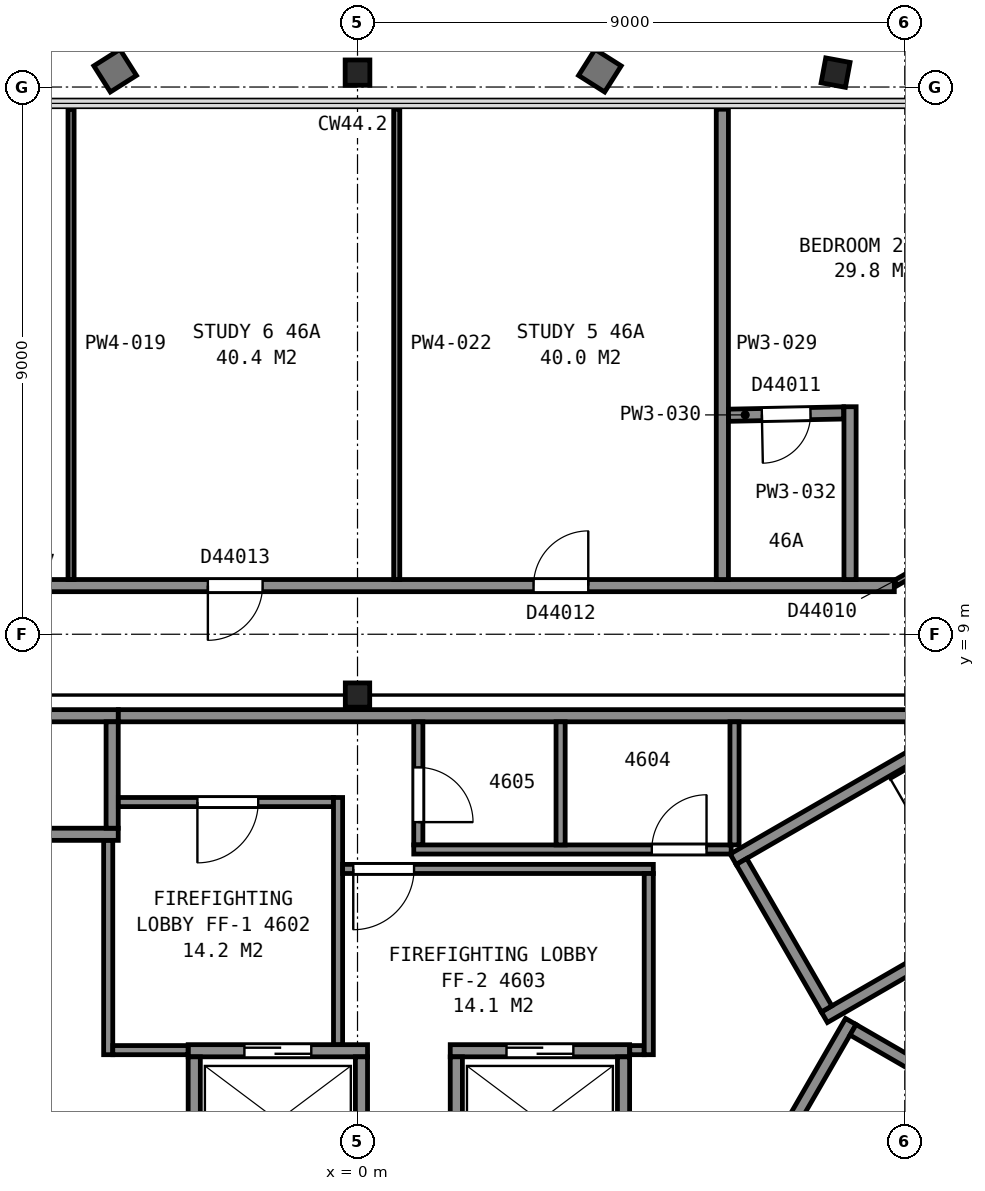
"""IFC4 building model, lengths in metres.
Left out: names, types, materials, properties, quantities, classifications, styles, units other than length and angle.
Written with IfcOpenShell. Run it as: python <this file> out.ifc"""

import sys

from ifc_helpers import new_model, si_unit, direction, frame, frame_2d, origin, origin_2d, place, context, subcontext, project, spatial, rectangle, i_section, extrude, element, fill, save


model = new_model("IFC4")
c1 = context("Model", 3, precision=1e-05, world=origin(), true_north=direction((0.0, 1.0)))
c2 = subcontext(c1, "Body", "Model", "MODEL_VIEW")
j1 = project(units=[si_unit("LENGTHUNIT", "METRE"), si_unit("PLANEANGLEUNIT", "RADIAN")], contexts=[c1])
p1 = place(None, origin())
s1 = spatial("IfcSite", under=j1, at=p1, CompositionType="ELEMENT")
p2 = place(p1, origin())
s2 = spatial("IfcBuilding", under=s1, at=p2, CompositionType="ELEMENT")
p3 = place(p2, frame((0.0, 0.0, 185.8)))
s3 = spatial("IfcBuildingStorey", under=s2, at=p3, CompositionType="ELEMENT", Elevation=185.8)
p4 = place(p3, frame((7.821, 18.017, 0.035), z_axis=(0.03447421706, 0.185777725267, 0.981986845713), x_axis=(0.999383372128, 0.000143167918, -0.035112035215)))
e1 = element("IfcColumn", 1, at=p4, inside=s3, PredefinedType="COLUMN", context=c2, shape_type="SweptSolid", body=[
    extrude(i_section(OverallWidth=0.406, OverallDepth=0.417, WebThickness=0.03, FlangeThickness=0.048, FilletRadius=0.015, at=origin_2d()), origin(), (0.0, 0.0, 1.0), 3.697),
])
p5 = place(p3, frame((0.0, 18.016, 0.03), z_axis=(0.0, 0.185915743066, 0.982565690669), x_axis=(1.0, 0.0, 0.0)))
e2 = element("IfcColumn", 2, at=p5, inside=s3, PredefinedType="COLUMN", context=c2, shape_type="SweptSolid", body=[
    extrude(i_section(OverallWidth=0.406, OverallDepth=0.417, WebThickness=0.03, FlangeThickness=0.048, FilletRadius=0.015, at=origin_2d()), origin(), (0.0, 0.0, 1.0), 3.705),
])
p6 = place(p3, frame((0.0, 8.0, 0.0), z_axis=(0.0, 0.0, 1.0), x_axis=(1.0, 0.0, 0.0)))
e3 = element("IfcColumn", 3, at=p6, inside=s3, PredefinedType="COLUMN", context=c2, shape_type="SweptSolid", body=[
    extrude(i_section(OverallWidth=0.401, OverallDepth=0.399, WebThickness=0.025, FlangeThickness=0.04, FilletRadius=0.015, at=origin_2d()), origin(), (0.0, 0.0, 1.0), 3.7),
])
for number, where, z_axis, x_axis in (
    (4, (6.178, 5.299, 0.0), (0.0, 0.0, 1.0), (0.866, 0.5, 0.0)),
    (5, (7.678, 2.701, 0.0), (0.0, 0.0, 1.0), (0.866, 0.5, 0.0)),
):
    element("IfcWall", number, at=place(p3, frame(where, z_axis=z_axis, x_axis=x_axis)), inside=s3, PredefinedType="PARTITIONING", context=c2, shape_type="SweptSolid", body=[
        extrude(rectangle(XDim=9.6, YDim=0.2, at=frame_2d((4.8, 0.0))), origin(), (0.0, 0.0, 1.0), 3.45),
    ])
p7 = place(p3, frame((7.715, 2.838, 0.0), z_axis=(0.0, 0.0, 1.0), x_axis=(-0.500049511043, 0.865996816683, 0.0)))
e6 = element("IfcWall", 6, at=p7, inside=s3, PredefinedType="PARTITIONING", context=c2, shape_type="SweptSolid", body=[
    extrude(rectangle(XDim=2.8, YDim=0.2, at=frame_2d((1.4, 0.0))), origin(), (0.0, 0.0, 1.0), 3.45),
])
p8 = place(p3, frame((-2.785, 2.15, 0.0), z_axis=(0.0, 0.0, 1.0), x_axis=(1.0, 0.0, 0.0)))
e7 = element("IfcWall", 7, at=p8, inside=s3, PredefinedType="PARTITIONING", context=c2, shape_type="SweptSolid", body=[
    extrude(rectangle(XDim=2.95, YDim=0.2, at=frame_2d((1.475, 0.0))), origin(), (0.0, 0.0, 1.0), 3.7),
])
p9 = place(p8, frame((0.925, 0.0, 0.0)))
e8 = element("IfcOpeningElement", 8, at=p9, cuts=e7, PredefinedType="OPENING", context=c2, shape_type="SweptSolid", body=[
    extrude(rectangle(XDim=1.1, YDim=2.1, at=frame_2d((0.55, 1.05))), frame((0.0, 0.11, 0.0), z_axis=(0.0, -1.0, 0.0), x_axis=(1.0, 0.0, 0.0)), (0.0, 0.0, 1.0), 0.22),
])
p10 = place(p3, frame((1.525, 2.15, 0.0), z_axis=(0.0, 0.0, 1.0), x_axis=(1.0, 0.0, 0.0)))
e9 = element("IfcWall", 9, at=p10, inside=s3, PredefinedType="PARTITIONING", context=c2, shape_type="SweptSolid", body=[
    extrude(rectangle(XDim=2.95, YDim=0.2, at=frame_2d((1.475, 0.0))), origin(), (0.0, 0.0, 1.0), 3.7),
])
p11 = place(p10, frame((0.925, 0.0, 0.0)))
e10 = element("IfcOpeningElement", 10, at=p11, cuts=e9, PredefinedType="OPENING", context=c2, shape_type="SweptSolid", body=[
    extrude(rectangle(XDim=1.1, YDim=2.1, at=frame_2d((0.55, 1.05))), frame((0.0, 0.11, 0.0), z_axis=(0.0, -1.0, 0.0), x_axis=(1.0, 0.0, 0.0)), (0.0, 0.0, 1.0), 0.22),
])
for number, where, z_axis, x_axis in (
    (11, (-6.285, 5.71, 0.0), (0.0, 0.0, 1.0), (1.0, 0.0, 0.0)),
    (12, (-6.285, 7.66, 0.0), (0.0, 0.0, 1.0), (1.0, 0.0, 0.0)),
):
    element("IfcWall", number, at=place(p3, frame(where, z_axis=z_axis, x_axis=x_axis)), inside=s3, PredefinedType="PARTITIONING", context=c2, shape_type="SweptSolid", body=[
        extrude(rectangle(XDim=2.35, YDim=0.2, at=frame_2d((1.175, 0.0))), origin(), (0.0, 0.0, 1.0), 3.7),
    ])
p12 = place(p3, frame((7.351, -2.587, 0.0), z_axis=(0.0, 0.0, 1.0), x_axis=(0.500002801628, 0.866023786258, 0.0)))
e13 = element("IfcWall", 13, at=p12, inside=s3, PredefinedType="PARTITIONING", context=c2, shape_type="SweptSolid", body=[
    extrude(rectangle(XDim=4.9, YDim=0.2, at=frame_2d((2.45, 0.0))), origin(), (0.0, 0.0, 1.0), 3.7),
])
p13 = place(p3, frame((5.663, -1.612, 0.0), z_axis=(0.0, 0.0, 1.0), x_axis=(0.49998122708, 0.866036242063, 0.0)))
e14 = element("IfcWall", 14, at=p13, inside=s3, PredefinedType="PARTITIONING", context=c2, shape_type="SweptSolid", body=[
    extrude(rectangle(XDim=4.9, YDim=0.2, at=frame_2d((2.45, 0.0))), origin(), (0.0, 0.0, 1.0), 3.7),
])
for number, where, z_axis, x_axis in (
    (15, (4.375, 0.1, 0.0), (0.0, 0.0, 1.0), (0.0, 1.0, 0.0)),
    (16, (1.625, 0.1, 0.0), (0.0, 0.0, 1.0), (0.0, 1.0, 0.0)),
    (17, (0.065, 0.1, 0.0), (0.0, 0.0, 1.0), (0.0, 1.0, 0.0)),
    (18, (-2.685, 0.1, 0.0), (0.0, 0.0, 1.0), (0.0, 1.0, 0.0)),
):
    element("IfcWall", number, at=place(p3, frame(where, z_axis=z_axis, x_axis=x_axis)), inside=s3, PredefinedType="PARTITIONING", context=c2, shape_type="SweptSolid", body=[
        extrude(rectangle(XDim=1.95, YDim=0.2, at=frame_2d((0.975, 0.0))), origin(), (0.0, 0.0, 1.0), 3.7),
    ])
p14 = place(p3, frame((-4.035, 5.81, 0.0), z_axis=(0.0, 0.0, 1.0), x_axis=(0.0, 1.0, 0.0)))
e19 = element("IfcWall", 19, at=p14, inside=s3, PredefinedType="PARTITIONING", context=c2, shape_type="SweptSolid", body=[
    extrude(rectangle(XDim=1.75, YDim=0.2, at=frame_2d((0.875, 0.0))), origin(), (0.0, 0.0, 1.0), 3.7),
])
p15 = place(p3, frame((9.665, 1.62, 0.0), z_axis=(0.0, 0.0, 1.0), x_axis=(-0.866002029911, 0.500040482552, 0.0)))
e20 = element("IfcWall", 20, at=p15, inside=s3, PredefinedType="PARTITIONING", context=c2, shape_type="SweptSolid", body=[
    extrude(rectangle(XDim=1.75, YDim=0.2, at=frame_2d((0.875, 0.0))), origin(), (0.0, 0.0, 1.0), 3.7),
])
p16 = place(p3, frame((-4.1, 2.085, 0.0), z_axis=(0.0, 0.0, 1.0), x_axis=(0.0, 1.0, 0.0)))
e21 = element("IfcWall", 21, at=p16, inside=s3, PredefinedType="PARTITIONING", context=c2, shape_type="SweptSolid", body=[
    extrude(rectangle(XDim=3.523, YDim=0.15, at=frame_2d((1.761, 0.0))), origin(), (0.0, 0.0, 1.0), 3.45),
])
p17 = place(p3, frame((-4.025, 2.16, 0.0), z_axis=(0.0, 0.0, 1.0), x_axis=(1.0, 0.0, 0.0)))
e22 = element("IfcWall", 22, at=p17, inside=s3, PredefinedType="PARTITIONING", context=c2, shape_type="SweptSolid", body=[
    extrude(rectangle(XDim=1.238, YDim=0.15, at=frame_2d((0.619, 0.0))), origin(), (0.0, 0.0, 1.0), 3.45),
])
p18 = place(p3, frame((-3.933, 6.24, 0.0), z_axis=(0.0, 0.0, 1.0), x_axis=(1.0, 0.0, 0.0)))
e23 = element("IfcWall", 23, at=p18, inside=s3, PredefinedType="PARTITIONING", context=c2, shape_type="SweptSolid", body=[
    extrude(rectangle(XDim=3.538, YDim=0.15, at=frame_2d((1.769, 0.0))), origin(), (0.0, 0.0, 1.0), 3.45),
])
p19 = place(p18, frame((1.3, 0.0, 0.0)))
e24 = element("IfcOpeningElement", 24, at=p19, cuts=e23, PredefinedType="OPENING", context=c2, shape_type="SweptSolid", body=[
    extrude(rectangle(XDim=1.0, YDim=2.1, at=frame_2d((0.5, 1.05))), frame((0.0, 0.085, 0.0), z_axis=(0.0, -1.0, 0.0), x_axis=(1.0, 0.0, 0.0)), (0.0, 0.0, 1.0), 0.17),
])
p20 = place(p3, frame((-3.933, 7.66, 0.0), z_axis=(0.0, 0.0, 1.0), x_axis=(1.0, 0.0, 0.0)))
e25 = element("IfcWall", 25, at=p20, inside=s3, PredefinedType="PARTITIONING", context=c2, shape_type="SweptSolid", body=[
    extrude(rectangle(XDim=13.841, YDim=0.2, at=frame_2d((6.92, 0.0))), origin(), (0.0, 0.0, 1.0), 3.45),
])
p21 = place(p3, frame((-0.32, 2.252, 0.0), z_axis=(0.0, 0.0, 1.0), x_axis=(0.0, 1.0, 0.0)))
e26 = element("IfcWall", 26, at=p21, inside=s3, PredefinedType="PARTITIONING", context=c2, shape_type="SweptSolid", body=[
    extrude(rectangle(XDim=4.063, YDim=0.15, at=frame_2d((2.031, 0.0))), origin(), (0.0, 0.0, 1.0), 3.45),
])
p22 = place(p3, frame((-0.245, 5.14, 0.0), z_axis=(0.0, 0.0, 1.0), x_axis=(1.0, 0.0, 0.0)))
e27 = element("IfcWall", 27, at=p22, inside=s3, PredefinedType="PARTITIONING", context=c2, shape_type="SweptSolid", body=[
    extrude(rectangle(XDim=5.11, YDim=0.15, at=frame_2d((2.555, 0.0))), origin(), (0.0, 0.0, 1.0), 3.45),
])
p23 = place(p22, frame((0.175, 0.0, 0.0)))
e28 = element("IfcOpeningElement", 28, at=p23, cuts=e27, PredefinedType="OPENING", context=c2, shape_type="SweptSolid", body=[
    extrude(rectangle(XDim=1.0, YDim=2.1, at=frame_2d((0.5, 1.05))), frame((0.0, 0.085, 0.0), z_axis=(0.0, -1.0, 0.0), x_axis=(1.0, 0.0, 0.0)), (0.0, 0.0, 1.0), 0.17),
])
p24 = place(p3, frame((1.0, 7.56, 0.0), z_axis=(0.0, 0.0, 1.0), x_axis=(0.0, -1.0, 0.0)))
e29 = element("IfcWall", 29, at=p24, inside=s3, PredefinedType="PARTITIONING", context=c2, shape_type="SweptSolid", body=[
    extrude(rectangle(XDim=2.025, YDim=0.15, at=frame_2d((1.013, 0.0))), origin(), (0.0, 0.0, 1.0), 3.45),
])
p25 = place(p24, frame((0.75, 0.0, 0.0)))
e30 = element("IfcOpeningElement", 30, at=p25, cuts=e29, PredefinedType="OPENING", context=c2, shape_type="SweptSolid", body=[
    extrude(rectangle(XDim=0.9, YDim=2.1, at=frame_2d((0.45, 1.05))), frame((0.0, 0.085, 0.0), z_axis=(0.0, -1.0, 0.0), x_axis=(1.0, 0.0, 0.0)), (0.0, 0.0, 1.0), 0.17),
])
p26 = place(p3, frame((0.925, 5.46, 0.0), z_axis=(0.0, 0.0, 1.0), x_axis=(1.0, 0.0, 0.0)))
e31 = element("IfcWall", 31, at=p26, inside=s3, PredefinedType="PARTITIONING", context=c2, shape_type="SweptSolid", body=[
    extrude(rectangle(XDim=5.22, YDim=0.15, at=frame_2d((2.61, 0.0))), origin(), (0.0, 0.0, 1.0), 3.45),
])
p27 = place(p26, frame((3.915, 0.0, 0.0)))
e32 = element("IfcOpeningElement", 32, at=p27, cuts=e31, PredefinedType="OPENING", context=c2, shape_type="SweptSolid", body=[
    extrude(rectangle(XDim=0.9, YDim=2.1, at=frame_2d((0.45, 1.05))), frame((0.0, 0.085, 0.0), z_axis=(0.0, -1.0, 0.0), x_axis=(1.0, 0.0, 0.0)), (0.0, 0.0, 1.0), 0.17),
])
p28 = place(p3, frame((3.34, 5.535, 0.0), z_axis=(0.0, 0.0, 1.0), x_axis=(0.0, 1.0, 0.0)))
e33 = element("IfcWall", 33, at=p28, inside=s3, PredefinedType="PARTITIONING", context=c2, shape_type="SweptSolid", body=[
    extrude(rectangle(XDim=2.025, YDim=0.15, at=frame_2d((1.013, 0.0))), origin(), (0.0, 0.0, 1.0), 3.45),
])
p29 = place(p3, frame((4.477, 2.16, 0.0), z_axis=(0.0, 0.0, 1.0), x_axis=(1.0, 0.0, 0.0)))
e34 = element("IfcWall", 34, at=p29, inside=s3, PredefinedType="PARTITIONING", context=c2, shape_type="SweptSolid", body=[
    extrude(rectangle(XDim=0.238, YDim=0.15, at=frame_2d((0.119, 0.0))), origin(), (0.0, 0.0, 1.0), 3.45),
])
p30 = place(p3, frame((4.79, 2.085, 0.0), z_axis=(0.0, 0.0, 1.0), x_axis=(0.0, 1.0, 0.0)))
e35 = element("IfcWall", 35, at=p30, inside=s3, PredefinedType="PARTITIONING", context=c2, shape_type="SweptSolid", body=[
    extrude(rectangle(XDim=2.98, YDim=0.15, at=frame_2d((1.49, 0.0))), origin(), (0.0, 0.0, 1.0), 3.45),
])
p31 = place(p3, frame((6.2, 5.535, 0.0), z_axis=(0.0, 0.0, 1.0), x_axis=(0.0, 1.0, 0.0)))
e36 = element("IfcWall", 36, at=p31, inside=s3, PredefinedType="PARTITIONING", context=c2, shape_type="SweptSolid", body=[
    extrude(rectangle(XDim=2.025, YDim=0.15, at=frame_2d((1.013, 0.0))), origin(), (0.0, 0.0, 1.0), 3.45),
])
p32 = place(p3, frame((-4.075, -12.545, 0.0), z_axis=(0.0, 0.0, 1.0), x_axis=(-0.499997769292, 0.86602669168, 0.0)))
e37 = element("IfcWall", 37, at=p32, inside=s3, PredefinedType="PARTITIONING", context=c2, shape_type="SweptSolid", body=[
    extrude(rectangle(XDim=17.706, YDim=0.2, at=frame_2d((8.853, 0.0))), origin(), (0.0, 0.0, 1.0), 2.713),
])
p33 = place(p32, frame((14.46, 0.0, 0.0)))
e38 = element("IfcOpeningElement", 38, at=p33, cuts=e37, PredefinedType="OPENING", context=c2, shape_type="SweptSolid", body=[
    extrude(rectangle(XDim=0.9, YDim=2.1, at=frame_2d((0.45, 1.05))), frame((0.0, 0.11, 0.0), z_axis=(0.0, -1.0, 0.0), x_axis=(1.0, 0.0, 0.0)), (0.0, 0.0, 1.0), 0.22),
])
p34 = place(p32, frame((10.896, 0.0, 0.0)))
e39 = element("IfcOpeningElement", 39, at=p34, cuts=e37, PredefinedType="OPENING", context=c2, shape_type="SweptSolid", body=[
    extrude(rectangle(XDim=0.9, YDim=2.1, at=frame_2d((0.45, 1.05))), frame((0.0, 0.11, 0.0), z_axis=(0.0, -1.0, 0.0), x_axis=(1.0, 0.0, 0.0)), (0.0, 0.0, 1.0), 0.22),
])
p35 = place(p32, frame((6.068, 0.0, 0.0)))
e40 = element("IfcOpeningElement", 40, at=p35, cuts=e37, PredefinedType="OPENING", context=c2, shape_type="SweptSolid", body=[
    extrude(rectangle(XDim=0.9, YDim=2.1, at=frame_2d((0.45, 1.05))), frame((0.0, 0.11, 0.0), z_axis=(0.0, -1.0, 0.0), x_axis=(1.0, 0.0, 0.0)), (0.0, 0.0, 1.0), 0.22),
])
p36 = place(p3, frame((-8.828, 9.8, 0.0), z_axis=(0.0, 0.0, 1.0), x_axis=(1.0, 0.0, 0.0)))
e41 = element("IfcWall", 41, at=p36, inside=s3, PredefinedType="PARTITIONING", context=c2, shape_type="SweptSolid", body=[
    extrude(rectangle(XDim=17.656, YDim=0.2, at=frame_2d((8.828, 0.0))), origin(), (0.0, 0.0, 1.0), 2.713),
])
p37 = place(p36, frame((11.723, 0.0, 0.0)))
e42 = element("IfcOpeningElement", 42, at=p37, cuts=e41, PredefinedType="OPENING", context=c2, shape_type="SweptSolid", body=[
    extrude(rectangle(XDim=0.9, YDim=2.1, at=frame_2d((0.45, 1.05))), frame((0.0, 0.11, 0.0), z_axis=(0.0, -1.0, 0.0), x_axis=(1.0, 0.0, 0.0)), (0.0, 0.0, 1.0), 0.22),
])
p38 = place(p36, frame((6.367, 0.0, 0.0)))
e43 = element("IfcOpeningElement", 43, at=p38, cuts=e41, PredefinedType="OPENING", context=c2, shape_type="SweptSolid", body=[
    extrude(rectangle(XDim=0.9, YDim=2.1, at=frame_2d((0.45, 1.05))), frame((0.0, 0.11, 0.0), z_axis=(0.0, -1.0, 0.0), x_axis=(1.0, 0.0, 0.0)), (0.0, 0.0, 1.0), 0.22),
])
for number, where, z_axis, x_axis in (
    (44, (-4.711, 9.9, 0.0), (0.0, 0.0, 1.0), (0.0, 1.0, 0.0)),
    (45, (0.645, 9.9, 0.0), (0.0, 0.0, 1.0), (0.0, 1.0, 0.0)),
):
    element("IfcWall", number, at=place(p3, frame(where, z_axis=z_axis, x_axis=x_axis)), inside=s3, PredefinedType="PARTITIONING", context=c2, shape_type="SweptSolid", body=[
        extrude(rectangle(XDim=7.735, YDim=0.1, at=frame_2d((3.868, 0.0))), origin(), (0.0, 0.0, 1.0), 2.713),
    ])
p39 = place(p3, frame((12.903, 2.745, 0.0), z_axis=(0.0, 0.0, 1.0), x_axis=(-0.499997333799, -0.866026943111, 0.0)))
e46 = element("IfcWall", 46, at=p39, inside=s3, PredefinedType="PARTITIONING", context=c2, shape_type="SweptSolid", body=[
    extrude(rectangle(XDim=17.606, YDim=0.1, at=frame_2d((8.803, 0.0))), origin(), (0.0, 0.0, 1.0), 2.713),
])
p40 = place(p39, frame((15.756, 0.0, 0.0)))
e47 = element("IfcOpeningElement", 47, at=p40, cuts=e46, PredefinedType="OPENING", context=c2, shape_type="SweptSolid", body=[
    extrude(rectangle(XDim=0.9, YDim=2.1, at=frame_2d((0.45, 1.05))), frame((0.0, 0.06, 0.0), z_axis=(0.0, -1.0, 0.0), x_axis=(1.0, 0.0, 0.0)), (0.0, 0.0, 1.0), 0.12),
])
p41 = place(p39, frame((11.679, 0.0, 0.0)))
e48 = element("IfcOpeningElement", 48, at=p41, cuts=e46, PredefinedType="OPENING", context=c2, shape_type="SweptSolid", body=[
    extrude(rectangle(XDim=0.9, YDim=2.1, at=frame_2d((0.45, 1.05))), frame((0.0, 0.06, 0.0), z_axis=(0.0, -1.0, 0.0), x_axis=(1.0, 0.0, 0.0)), (0.0, 0.0, 1.0), 0.12),
])
p42 = place(p39, frame((6.324, 0.0, 0.0)))
e49 = element("IfcOpeningElement", 49, at=p42, cuts=e46, PredefinedType="OPENING", context=c2, shape_type="SweptSolid", body=[
    extrude(rectangle(XDim=0.9, YDim=2.1, at=frame_2d((0.45, 1.05))), frame((0.0, 0.06, 0.0), z_axis=(0.0, -1.0, 0.0), x_axis=(1.0, 0.0, 0.0)), (0.0, 0.0, 1.0), 0.12),
])
p43 = place(p3, frame((6.0, 9.9, 0.0), z_axis=(0.0, 0.0, 1.0), x_axis=(0.0, 1.0, 0.0)))
e50 = element("IfcWall", 50, at=p43, inside=s3, PredefinedType="PARTITIONING", context=c2, shape_type="SweptSolid", body=[
    extrude(rectangle(XDim=7.735, YDim=0.2, at=frame_2d((3.868, 0.0))), origin(), (0.0, 0.0, 1.0), 2.713),
])
p44 = place(p3, frame((7.995, 12.64, 0.0), z_axis=(0.0, 0.0, 1.0), x_axis=(-0.999800266148, -0.019985690128, 0.0)))
e51 = element("IfcWall", 51, at=p44, inside=s3, PredefinedType="PARTITIONING", context=c2, shape_type="SweptSolid", body=[
    extrude(rectangle(XDim=1.894, YDim=0.2, at=frame_2d((0.947, 0.0))), origin(), (0.0, 0.0, 1.0), 2.713),
])
p45 = place(p44, frame((0.545, 0.0, 0.0)))
e52 = element("IfcOpeningElement", 52, at=p45, cuts=e51, PredefinedType="OPENING", context=c2, shape_type="SweptSolid", body=[
    extrude(rectangle(XDim=0.8, YDim=2.1, at=frame_2d((0.4, 1.05))), frame((0.0, 0.11, 0.0), z_axis=(0.0, -1.0, 0.0), x_axis=(1.0, 0.0, 0.0)), (0.0, 0.0, 1.0), 0.22),
])
p46 = place(p3, frame((8.1, 9.9, 0.0), z_axis=(0.0, 0.0, 1.0), x_axis=(0.0, 1.0, 0.0)))
e53 = element("IfcWall", 53, at=p46, inside=s3, PredefinedType="PARTITIONING", context=c2, shape_type="SweptSolid", body=[
    extrude(rectangle(XDim=2.842, YDim=0.2, at=frame_2d((1.421, 0.0))), origin(), (0.0, 0.0, 1.0), 2.713),
])
p47 = place(p3, frame((8.852, 9.843, 0.0), z_axis=(0.0, 0.0, 1.0), x_axis=(0.866088973199, 0.499889878377, 0.0)))
e54 = element("IfcWall", 54, at=p47, inside=s3, PredefinedType="PARTITIONING", context=c2, shape_type="SweptSolid", body=[
    extrude(rectangle(XDim=8.163, YDim=0.1, at=frame_2d((4.082, 0.0))), origin(), (0.0, 0.0, 1.0), 2.713),
])
p48 = place(p47, frame((4.583, 0.0, 0.0)))
e55 = element("IfcOpeningElement", 55, at=p48, cuts=e54, PredefinedType="OPENING", context=c2, shape_type="SweptSolid", body=[
    extrude(rectangle(XDim=0.9, YDim=2.1, at=frame_2d((0.45, 1.05))), frame((0.0, 0.06, 0.0), z_axis=(0.0, -1.0, 0.0), x_axis=(1.0, 0.0, 0.0)), (0.0, 0.0, 1.0), 0.12),
])
p49 = place(p47, frame((0.715, 0.0, 0.0)))
e56 = element("IfcOpeningElement", 56, at=p49, cuts=e54, PredefinedType="OPENING", context=c2, shape_type="SweptSolid", body=[
    extrude(rectangle(XDim=0.9, YDim=2.1, at=frame_2d((0.45, 1.05))), frame((0.0, 0.06, 0.0), z_axis=(0.0, -1.0, 0.0), x_axis=(1.0, 0.0, 0.0)), (0.0, 0.0, 1.0), 0.12),
])
p50 = place(p9, origin())
e57 = element("IfcDoor", 57, at=p50, inside=s3, OperationType="SLIDING_TO_LEFT", PredefinedType="DOOR", context=c2, shape_type="SweptSolid", body=[
    extrude(rectangle(XDim=1.1, YDim=2.1, at=frame_2d((0.55, 1.05))), frame((0.0, 0.025, 0.0), z_axis=(0.0, -1.0, 0.0), x_axis=(1.0, 0.0, 0.0)), (0.0, 0.0, 1.0), 0.05),
])
fill(e8, e57)
p51 = place(p11, origin())
e58 = element("IfcDoor", 58, at=p51, inside=s3, OperationType="SLIDING_TO_RIGHT", PredefinedType="DOOR", context=c2, shape_type="SweptSolid", body=[
    extrude(rectangle(XDim=1.1, YDim=2.1, at=frame_2d((0.55, 1.05))), frame((0.0, 0.025, 0.0), z_axis=(0.0, -1.0, 0.0), x_axis=(1.0, 0.0, 0.0)), (0.0, 0.0, 1.0), 0.05),
])
fill(e10, e58)
p52 = place(p19, origin())
e59 = element("IfcDoor", 59, at=p52, inside=s3, OperationType="SINGLE_SWING_LEFT", PredefinedType="DOOR", context=c2, shape_type="SweptSolid", body=[
    extrude(rectangle(XDim=1.0, YDim=2.1, at=frame_2d((0.5, 1.05))), frame((0.0, 0.025, 0.0), z_axis=(0.0, -1.0, 0.0), x_axis=(1.0, 0.0, 0.0)), (0.0, 0.0, 1.0), 0.05),
])
fill(e24, e59)
p53 = place(p23, origin())
e60 = element("IfcDoor", 60, at=p53, inside=s3, OperationType="SINGLE_SWING_LEFT", PredefinedType="DOOR", context=c2, shape_type="SweptSolid", body=[
    extrude(rectangle(XDim=1.0, YDim=2.1, at=frame_2d((0.5, 1.05))), frame((0.0, 0.025, 0.0), z_axis=(0.0, -1.0, 0.0), x_axis=(1.0, 0.0, 0.0)), (0.0, 0.0, 1.0), 0.05),
])
fill(e28, e60)
p54 = place(p25, origin())
e61 = element("IfcDoor", 61, at=p54, inside=s3, OperationType="SINGLE_SWING_RIGHT", PredefinedType="DOOR", context=c2, shape_type="SweptSolid", body=[
    extrude(rectangle(XDim=0.9, YDim=2.1, at=frame_2d((0.45, 1.05))), frame((0.0, 0.025, 0.0), z_axis=(0.0, -1.0, 0.0), x_axis=(1.0, 0.0, 0.0)), (0.0, 0.0, 1.0), 0.05),
])
fill(e30, e61)
p55 = place(p27, origin())
e62 = element("IfcDoor", 62, at=p55, inside=s3, OperationType="SINGLE_SWING_RIGHT", PredefinedType="DOOR", context=c2, shape_type="SweptSolid", body=[
    extrude(rectangle(XDim=0.9, YDim=2.1, at=frame_2d((0.45, 1.05))), frame((0.0, 0.025, 0.0), z_axis=(0.0, -1.0, 0.0), x_axis=(1.0, 0.0, 0.0)), (0.0, 0.0, 1.0), 0.05),
])
fill(e32, e62)
p56 = place(p37, origin())
e63 = element("IfcDoor", 63, at=p56, inside=s3, OperationType="SINGLE_SWING_RIGHT", PredefinedType="DOOR", context=c2, shape_type="SweptSolid", body=[
    extrude(rectangle(XDim=0.9, YDim=2.1, at=frame_2d((0.45, 1.05))), frame((0.0, 0.025, 0.0), z_axis=(0.0, -1.0, 0.0), x_axis=(1.0, 0.0, 0.0)), (0.0, 0.0, 1.0), 0.05),
])
fill(e42, e63)
p57 = place(p38, origin())
e64 = element("IfcDoor", 64, at=p57, inside=s3, OperationType="SINGLE_SWING_LEFT", PredefinedType="DOOR", context=c2, shape_type="SweptSolid", body=[
    extrude(rectangle(XDim=0.9, YDim=2.1, at=frame_2d((0.45, 1.05))), frame((0.0, 0.025, 0.0), z_axis=(0.0, -1.0, 0.0), x_axis=(1.0, 0.0, 0.0)), (0.0, 0.0, 1.0), 0.05),
])
fill(e43, e64)
p58 = place(p45, origin())
e65 = element("IfcDoor", 65, at=p58, inside=s3, OperationType="SINGLE_SWING_RIGHT", PredefinedType="DOOR", context=c2, shape_type="SweptSolid", body=[
    extrude(rectangle(XDim=0.8, YDim=2.1, at=frame_2d((0.4, 1.05))), frame((0.0, 0.025, 0.0), z_axis=(0.0, -1.0, 0.0), x_axis=(1.0, 0.0, 0.0)), (0.0, 0.0, 1.0), 0.05),
])
fill(e52, e65)
save(model, sys.argv[1])
